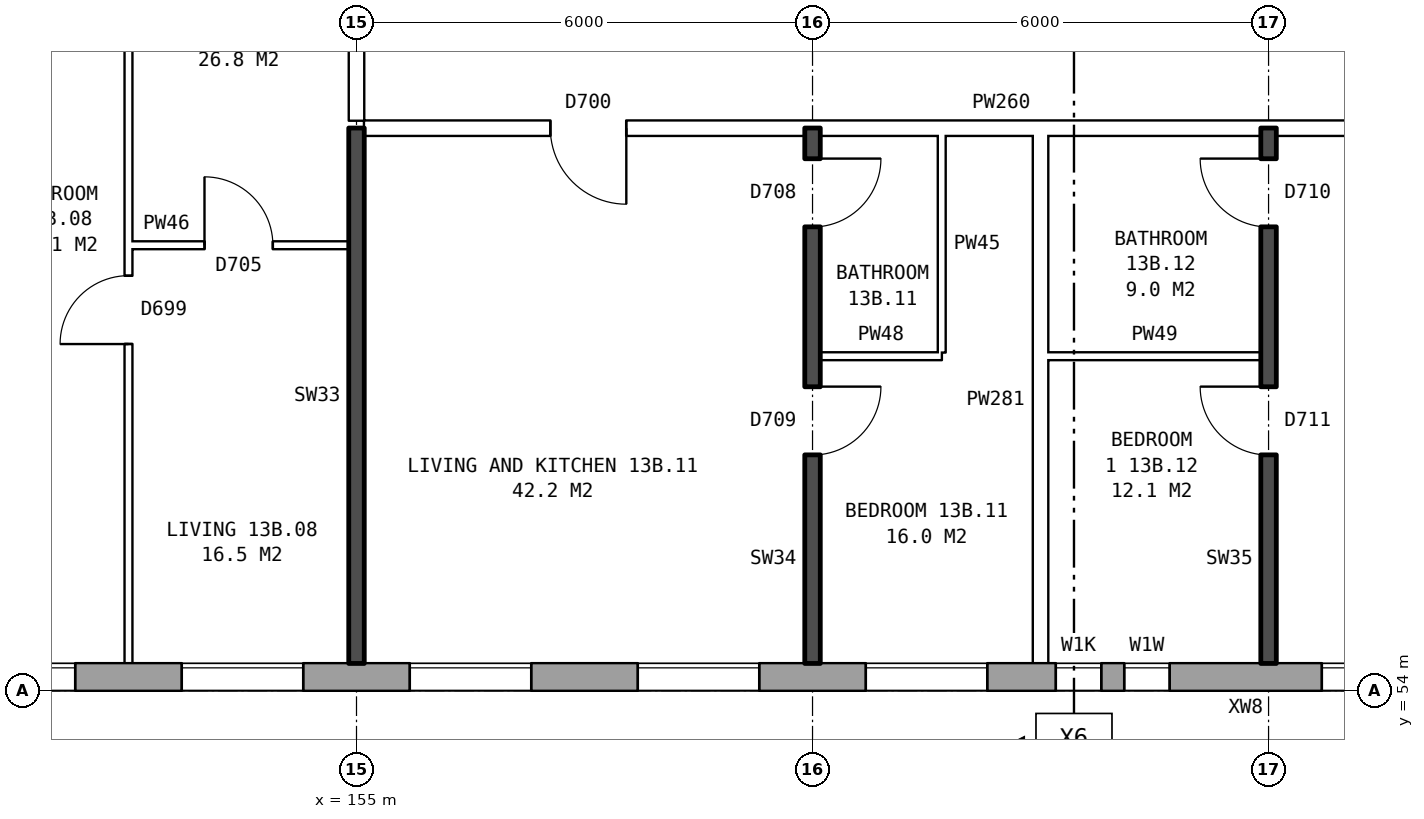
"""IFC4 building model, lengths in metres.
Left out: names, types, materials, properties, quantities, classifications, styles, units other than length and angle.
Written with IfcOpenShell. Run it as: python <this file> out.ifc"""

import sys

from ifc_helpers import new_model, si_unit, direction, frame, frame_2d, origin, place, context, subcontext, project, spatial, rectangle, extrude, element, fill, save


model = new_model("IFC4")
c1 = context("Model", 3, precision=1e-05, world=origin(), true_north=direction((0.0, 1.0)))
c2 = subcontext(c1, "Body", "Model", "MODEL_VIEW")
j1 = project(units=[si_unit("LENGTHUNIT", "METRE"), si_unit("PLANEANGLEUNIT", "RADIAN")], contexts=[c1])
p1 = place(None, origin())
s1 = spatial("IfcSite", under=j1, at=p1, CompositionType="ELEMENT")
p2 = place(p1, origin())
s2 = spatial("IfcBuilding", under=s1, at=p2, CompositionType="ELEMENT")
p3 = place(p2, frame((0.0, 0.0, 50.5)))
s3 = spatial("IfcBuildingStorey", under=s2, at=p3, CompositionType="ELEMENT", Elevation=50.5)
p4 = place(p3, frame((134.075, 54.18, 0.0), z_axis=(0.0, 0.0, 1.0), x_axis=(1.0, 0.0, 0.0)))
e1 = element("IfcWall", 1, at=p4, inside=s3, PredefinedType="STANDARD", context=c2, shape_type="SweptSolid", body=[
    extrude(rectangle(XDim=39.351, YDim=0.36, at=frame_2d((19.675, 0.0))), origin(), (0.0, 0.0, 1.0), 2.85),
])
p5 = place(p4, frame((0.625, 0.0, 0.8)))
e2 = element("IfcOpeningElement", 2, at=p5, cuts=e1, PredefinedType="OPENING", context=c2, shape_type="SweptSolid", body=[
    extrude(rectangle(XDim=1.6, YDim=1.8, at=frame_2d((0.8, 0.9))), frame((0.0, 0.19, 0.0), z_axis=(0.0, -1.0, 0.0), x_axis=(1.0, 0.0, 0.0)), (0.0, 0.0, 1.0), 0.38),
])
p6 = place(p4, frame((3.625, 0.0, 0.8)))
e3 = element("IfcOpeningElement", 3, at=p6, cuts=e1, PredefinedType="OPENING", context=c2, shape_type="SweptSolid", body=[
    extrude(rectangle(XDim=1.6, YDim=1.8, at=frame_2d((0.8, 0.9))), frame((0.0, 0.19, 0.0), z_axis=(0.0, -1.0, 0.0), x_axis=(1.0, 0.0, 0.0)), (0.0, 0.0, 1.0), 0.38),
])
p7 = place(p4, frame((5.525, 0.0, 1.4)))
e4 = element("IfcOpeningElement", 4, at=p7, cuts=e1, PredefinedType="OPENING", context=c2, shape_type="SweptSolid", body=[
    extrude(rectangle(XDim=0.6, YDim=1.2, at=frame_2d((0.3, 0.6))), frame((0.0, 0.19, 0.0), z_axis=(0.0, -1.0, 0.0), x_axis=(1.0, 0.0, 0.0)), (0.0, 0.0, 1.0), 0.38),
])
p8 = place(p4, frame((9.625, 0.0, 0.8)))
e5 = element("IfcOpeningElement", 5, at=p8, cuts=e1, PredefinedType="OPENING", context=c2, shape_type="SweptSolid", body=[
    extrude(rectangle(XDim=1.6, YDim=1.8, at=frame_2d((0.8, 0.9))), frame((0.0, 0.19, 0.0), z_axis=(0.0, -1.0, 0.0), x_axis=(1.0, 0.0, 0.0)), (0.0, 0.0, 1.0), 0.38),
])
p9 = place(p4, frame((12.625, 0.0, 0.8)))
e6 = element("IfcOpeningElement", 6, at=p9, cuts=e1, PredefinedType="OPENING", context=c2, shape_type="SweptSolid", body=[
    extrude(rectangle(XDim=1.6, YDim=1.8, at=frame_2d((0.8, 0.9))), frame((0.0, 0.19, 0.0), z_axis=(0.0, -1.0, 0.0), x_axis=(1.0, 0.0, 0.0)), (0.0, 0.0, 1.0), 0.38),
])
p10 = place(p4, frame((15.625, 0.0, 0.8)))
e7 = element("IfcOpeningElement", 7, at=p10, cuts=e1, PredefinedType="OPENING", context=c2, shape_type="SweptSolid", body=[
    extrude(rectangle(XDim=1.6, YDim=1.8, at=frame_2d((0.8, 0.9))), frame((0.0, 0.19, 0.0), z_axis=(0.0, -1.0, 0.0), x_axis=(1.0, 0.0, 0.0)), (0.0, 0.0, 1.0), 0.38),
])
p11 = place(p4, frame((18.625, 0.0, 0.8)))
e8 = element("IfcOpeningElement", 8, at=p11, cuts=e1, PredefinedType="OPENING", context=c2, shape_type="SweptSolid", body=[
    extrude(rectangle(XDim=1.6, YDim=1.8, at=frame_2d((0.8, 0.9))), frame((0.0, 0.19, 0.0), z_axis=(0.0, -1.0, 0.0), x_axis=(1.0, 0.0, 0.0)), (0.0, 0.0, 1.0), 0.38),
])
p12 = place(p4, frame((21.625, 0.0, 0.8)))
e9 = element("IfcOpeningElement", 9, at=p12, cuts=e1, PredefinedType="OPENING", context=c2, shape_type="SweptSolid", body=[
    extrude(rectangle(XDim=1.6, YDim=1.8, at=frame_2d((0.8, 0.9))), frame((0.0, 0.19, 0.0), z_axis=(0.0, -1.0, 0.0), x_axis=(1.0, 0.0, 0.0)), (0.0, 0.0, 1.0), 0.38),
])
p13 = place(p4, frame((24.625, 0.0, 0.8)))
e10 = element("IfcOpeningElement", 10, at=p13, cuts=e1, PredefinedType="OPENING", context=c2, shape_type="SweptSolid", body=[
    extrude(rectangle(XDim=1.6, YDim=1.8, at=frame_2d((0.8, 0.9))), frame((0.0, 0.19, 0.0), z_axis=(0.0, -1.0, 0.0), x_axis=(1.0, 0.0, 0.0)), (0.0, 0.0, 1.0), 0.38),
])
p14 = place(p4, frame((27.625, 0.0, 0.8)))
e11 = element("IfcOpeningElement", 11, at=p14, cuts=e1, PredefinedType="OPENING", context=c2, shape_type="SweptSolid", body=[
    extrude(rectangle(XDim=1.6, YDim=1.8, at=frame_2d((0.8, 0.9))), frame((0.0, 0.19, 0.0), z_axis=(0.0, -1.0, 0.0), x_axis=(1.0, 0.0, 0.0)), (0.0, 0.0, 1.0), 0.38),
])
p15 = place(p4, frame((30.125, 0.0, 0.8)))
e12 = element("IfcOpeningElement", 12, at=p15, cuts=e1, PredefinedType="OPENING", context=c2, shape_type="SweptSolid", body=[
    extrude(rectangle(XDim=0.6, YDim=1.5, at=frame_2d((0.3, 0.75))), frame((0.0, 0.19, 0.0), z_axis=(0.0, -1.0, 0.0), x_axis=(1.0, 0.0, 0.0)), (0.0, 0.0, 1.0), 0.38),
])
p16 = place(p4, frame((33.625, 0.0, 0.8)))
e13 = element("IfcOpeningElement", 13, at=p16, cuts=e1, PredefinedType="OPENING", context=c2, shape_type="SweptSolid", body=[
    extrude(rectangle(XDim=1.6, YDim=1.8, at=frame_2d((0.8, 0.9))), frame((0.0, 0.19, 0.0), z_axis=(0.0, -1.0, 0.0), x_axis=(1.0, 0.0, 0.0)), (0.0, 0.0, 1.0), 0.38),
])
p17 = place(p4, frame((36.625, 0.0, 0.8)))
e14 = element("IfcOpeningElement", 14, at=p17, cuts=e1, PredefinedType="OPENING", context=c2, shape_type="SweptSolid", body=[
    extrude(rectangle(XDim=1.6, YDim=1.8, at=frame_2d((0.8, 0.9))), frame((0.0, 0.19, 0.0), z_axis=(0.0, -1.0, 0.0), x_axis=(1.0, 0.0, 0.0)), (0.0, 0.0, 1.0), 0.38),
])
p18 = place(p4, frame((7.725, 0.0, 0.8)))
e15 = element("IfcOpeningElement", 15, at=p18, cuts=e1, PredefinedType="OPENING", context=c2, shape_type="SweptSolid", body=[
    extrude(rectangle(XDim=1.0, YDim=0.9, at=frame_2d((0.5, 0.45))), frame((0.0, 0.19, 0.0), z_axis=(0.0, -1.0, 0.0), x_axis=(1.0, 0.0, 0.0)), (0.0, 0.0, 1.0), 0.38),
])
p19 = place(p4, frame((31.025, 0.0, 0.8)))
e16 = element("IfcOpeningElement", 16, at=p19, cuts=e1, PredefinedType="OPENING", context=c2, shape_type="SweptSolid", body=[
    extrude(rectangle(XDim=0.6, YDim=0.9, at=frame_2d((0.3, 0.45))), frame((0.0, 0.19, 0.0), z_axis=(0.0, -1.0, 0.0), x_axis=(1.0, 0.0, 0.0)), (0.0, 0.0, 1.0), 0.38),
])
p20 = place(p3, frame((161.1, 58.4, 0.0), z_axis=(0.0, 0.0, 1.0), x_axis=(1.0, 0.0, 0.0)))
e17 = element("IfcWall", 17, at=p20, inside=s3, PredefinedType="PARTITIONING", context=c2, shape_type="SweptSolid", body=[
    extrude(rectangle(XDim=1.6, YDim=0.1, at=frame_2d((0.8, 0.0))), origin(), (0.0, 0.0, 1.0), 2.85),
])
p21 = place(p3, frame((164.1, 58.4, 0.0), z_axis=(0.0, 0.0, 1.0), x_axis=(1.0, 0.0, 0.0)))
e18 = element("IfcWall", 18, at=p21, inside=s3, PredefinedType="PARTITIONING", context=c2, shape_type="SweptSolid", body=[
    extrude(rectangle(XDim=2.8, YDim=0.1, at=frame_2d((1.4, 0.0))), origin(), (0.0, 0.0, 1.0), 2.85),
])
p22 = place(p3, frame((152.0, 59.86, 0.0), z_axis=(0.0, 0.0, 1.0), x_axis=(1.0, 0.0, 0.0)))
e19 = element("IfcWall", 19, at=p22, inside=s3, PredefinedType="PARTITIONING", context=c2, shape_type="SweptSolid", body=[
    extrude(rectangle(XDim=2.9, YDim=0.1, at=frame_2d((1.45, 0.0))), origin(), (0.0, 0.0, 1.0), 2.85),
])
p23 = place(p22, frame((1.0, 0.0, 0.0)))
e20 = element("IfcOpeningElement", 20, at=p23, cuts=e19, PredefinedType="OPENING", context=c2, shape_type="SweptSolid", body=[
    extrude(rectangle(XDim=0.9, YDim=2.1, at=frame_2d((0.45, 1.05))), frame((0.0, 0.06, 0.0), z_axis=(0.0, -1.0, 0.0), x_axis=(1.0, 0.0, 0.0)), (0.0, 0.0, 1.0), 0.12),
])
p24 = place(p3, frame((155.1, 61.4, 0.0), z_axis=(0.0, 0.0, 1.0), x_axis=(1.0, 0.0, 0.0)))
e21 = element("IfcWall", 21, at=p24, inside=s3, PredefinedType="PARTITIONING", context=c2, shape_type="SweptSolid", body=[
    extrude(rectangle(XDim=21.04, YDim=0.2, at=frame_2d((10.52, 0.0))), origin(), (0.0, 0.0, 1.0), 2.85),
])
p25 = place(p24, frame((2.45, 0.0, 0.0)))
e22 = element("IfcOpeningElement", 22, at=p25, cuts=e21, PredefinedType="OPENING", context=c2, shape_type="SweptSolid", body=[
    extrude(rectangle(XDim=1.0, YDim=2.1, at=frame_2d((0.5, 1.05))), frame((0.0, 0.11, 0.0), z_axis=(0.0, -1.0, 0.0), x_axis=(1.0, 0.0, 0.0)), (0.0, 0.0, 1.0), 0.22),
])
p26 = place(p24, frame((14.4, 0.0, 0.0)))
e23 = element("IfcOpeningElement", 23, at=p26, cuts=e21, PredefinedType="OPENING", context=c2, shape_type="SweptSolid", body=[
    extrude(rectangle(XDim=1.0, YDim=2.1, at=frame_2d((0.5, 1.05))), frame((0.0, 0.11, 0.0), z_axis=(0.0, -1.0, 0.0), x_axis=(1.0, 0.0, 0.0)), (0.0, 0.0, 1.0), 0.22),
])
p27 = place(p3, frame((152.0, 54.36, 0.0), z_axis=(0.0, 0.0, 1.0), x_axis=(0.0, 1.0, 0.0)))
e24 = element("IfcWall", 24, at=p27, inside=s3, PredefinedType="PARTITIONING", context=c2, shape_type="SweptSolid", body=[
    extrude(rectangle(XDim=14.34, YDim=0.1, at=frame_2d((7.17, 0.0))), origin(), (0.0, 0.0, 1.0), 2.85),
])
p28 = place(p27, frame((4.2, 0.0, 0.0)))
e25 = element("IfcOpeningElement", 25, at=p28, cuts=e24, PredefinedType="OPENING", context=c2, shape_type="SweptSolid", body=[
    extrude(rectangle(XDim=0.9, YDim=2.1, at=frame_2d((0.45, 1.05))), frame((0.0, 0.06, 0.0), z_axis=(0.0, -1.0, 0.0), x_axis=(1.0, 0.0, 0.0)), (0.0, 0.0, 1.0), 0.12),
])
p29 = place(p27, frame((13.04, 0.0, 0.0)))
e26 = element("IfcOpeningElement", 26, at=p29, cuts=e24, PredefinedType="OPENING", context=c2, shape_type="SweptSolid", body=[
    extrude(rectangle(XDim=0.9, YDim=2.1, at=frame_2d((0.45, 1.05))), frame((0.0, 0.06, 0.0), z_axis=(0.0, -1.0, 0.0), x_axis=(1.0, 0.0, 0.0)), (0.0, 0.0, 1.0), 0.12),
])
p30 = place(p3, frame((155.0, 54.36, 0.0), z_axis=(0.0, 0.0, 1.0), x_axis=(0.0, 1.0, 0.0)))
e27 = element("IfcWall", 27, at=p30, inside=s3, PredefinedType="SOLIDWALL", context=c2, shape_type="SweptSolid", body=[
    extrude(rectangle(XDim=7.04, YDim=0.2, at=frame_2d((3.52, 0.0))), origin(), (0.0, 0.0, 1.0), 2.85),
])
p31 = place(p3, frame((155.0, 61.5, 0.0), z_axis=(0.0, 0.0, 1.0), x_axis=(0.0, 1.0, 0.0)))
e28 = element("IfcWall", 28, at=p31, inside=s3, PredefinedType="PARTITIONING", context=c2, shape_type="SweptSolid", body=[
    extrude(rectangle(XDim=2.2, YDim=0.2, at=frame_2d((1.1, 0.0))), origin(), (0.0, 0.0, 1.0), 2.85),
])
p32 = place(p3, frame((161.0, 54.36, 0.0), z_axis=(0.0, 0.0, 1.0), x_axis=(0.0, 1.0, 0.0)))
e29 = element("IfcWall", 29, at=p32, inside=s3, PredefinedType="SOLIDWALL", context=c2, shape_type="SweptSolid", body=[
    extrude(rectangle(XDim=7.04, YDim=0.2, at=frame_2d((3.52, 0.0))), origin(), (0.0, 0.0, 1.0), 2.85),
])
p33 = place(p32, frame((2.74, 0.0, 0.0)))
e30 = element("IfcOpeningElement", 30, at=p33, cuts=e29, PredefinedType="OPENING", context=c2, shape_type="SweptSolid", body=[
    extrude(rectangle(XDim=0.9, YDim=2.1, at=frame_2d((0.45, 1.05))), frame((0.0, 0.11, 0.0), z_axis=(0.0, -1.0, 0.0), x_axis=(1.0, 0.0, 0.0)), (0.0, 0.0, 1.0), 0.22),
])
p34 = place(p32, frame((5.74, 0.0, 0.0)))
e31 = element("IfcOpeningElement", 31, at=p34, cuts=e29, PredefinedType="OPENING", context=c2, shape_type="SweptSolid", body=[
    extrude(rectangle(XDim=0.9, YDim=2.1, at=frame_2d((0.45, 1.05))), frame((0.0, 0.11, 0.0), z_axis=(0.0, -1.0, 0.0), x_axis=(1.0, 0.0, 0.0)), (0.0, 0.0, 1.0), 0.22),
])
p35 = place(p3, frame((162.7, 58.45, 0.0), z_axis=(0.0, 0.0, 1.0), x_axis=(0.0, 1.0, 0.0)))
e32 = element("IfcWall", 32, at=p35, inside=s3, PredefinedType="PARTITIONING", context=c2, shape_type="SweptSolid", body=[
    extrude(rectangle(XDim=2.85, YDim=0.1, at=frame_2d((1.425, 0.0))), origin(), (0.0, 0.0, 1.0), 2.85),
])
p36 = place(p3, frame((164.0, 54.36, 0.0), z_axis=(0.0, 0.0, 1.0), x_axis=(0.0, 1.0, 0.0)))
e33 = element("IfcWall", 33, at=p36, inside=s3, PredefinedType="PARTITIONING", context=c2, shape_type="SweptSolid", body=[
    extrude(rectangle(XDim=6.94, YDim=0.2, at=frame_2d((3.47, 0.0))), origin(), (0.0, 0.0, 1.0), 2.85),
])
p37 = place(p3, frame((167.0, 54.36, 0.0), z_axis=(0.0, 0.0, 1.0), x_axis=(0.0, 1.0, 0.0)))
e34 = element("IfcWall", 34, at=p37, inside=s3, PredefinedType="SOLIDWALL", context=c2, shape_type="SweptSolid", body=[
    extrude(rectangle(XDim=7.04, YDim=0.2, at=frame_2d((3.52, 0.0))), origin(), (0.0, 0.0, 1.0), 2.85),
])
p38 = place(p37, frame((2.74, 0.0, 0.0)))
e35 = element("IfcOpeningElement", 35, at=p38, cuts=e34, PredefinedType="OPENING", context=c2, shape_type="SweptSolid", body=[
    extrude(rectangle(XDim=0.9, YDim=2.1, at=frame_2d((0.45, 1.05))), frame((0.0, 0.11, 0.0), z_axis=(0.0, -1.0, 0.0), x_axis=(1.0, 0.0, 0.0)), (0.0, 0.0, 1.0), 0.22),
])
p39 = place(p37, frame((5.74, 0.0, 0.0)))
e36 = element("IfcOpeningElement", 36, at=p39, cuts=e34, PredefinedType="OPENING", context=c2, shape_type="SweptSolid", body=[
    extrude(rectangle(XDim=0.9, YDim=2.1, at=frame_2d((0.45, 1.05))), frame((0.0, 0.11, 0.0), z_axis=(0.0, -1.0, 0.0), x_axis=(1.0, 0.0, 0.0)), (0.0, 0.0, 1.0), 0.22),
])
p40 = place(p10, origin())
e37 = element("IfcWindow", 37, at=p40, inside=s3, PartitioningType="SINGLE_PANEL", PredefinedType="WINDOW", context=c2, shape_type="SweptSolid", body=[
    extrude(rectangle(XDim=1.6, YDim=1.8, at=frame_2d((0.8, 0.9))), frame((0.0, 0.15, 0.0), z_axis=(0.0, -1.0, 0.0), x_axis=(1.0, 0.0, 0.0)), (0.0, 0.0, 1.0), 0.06),
])
fill(e7, e37)
p41 = place(p11, origin())
e38 = element("IfcWindow", 38, at=p41, inside=s3, PartitioningType="SINGLE_PANEL", PredefinedType="WINDOW", context=c2, shape_type="SweptSolid", body=[
    extrude(rectangle(XDim=1.6, YDim=1.8, at=frame_2d((0.8, 0.9))), frame((0.0, 0.15, 0.0), z_axis=(0.0, -1.0, 0.0), x_axis=(1.0, 0.0, 0.0)), (0.0, 0.0, 1.0), 0.06),
])
fill(e8, e38)
p42 = place(p12, origin())
e39 = element("IfcWindow", 39, at=p42, inside=s3, PartitioningType="SINGLE_PANEL", PredefinedType="WINDOW", context=c2, shape_type="SweptSolid", body=[
    extrude(rectangle(XDim=1.6, YDim=1.8, at=frame_2d((0.8, 0.9))), frame((0.0, 0.15, 0.0), z_axis=(0.0, -1.0, 0.0), x_axis=(1.0, 0.0, 0.0)), (0.0, 0.0, 1.0), 0.06),
])
fill(e9, e39)
p43 = place(p13, origin())
e40 = element("IfcWindow", 40, at=p43, inside=s3, PartitioningType="SINGLE_PANEL", PredefinedType="WINDOW", context=c2, shape_type="SweptSolid", body=[
    extrude(rectangle(XDim=1.6, YDim=1.8, at=frame_2d((0.8, 0.9))), frame((0.0, 0.15, 0.0), z_axis=(0.0, -1.0, 0.0), x_axis=(1.0, 0.0, 0.0)), (0.0, 0.0, 1.0), 0.06),
])
fill(e10, e40)
p44 = place(p14, origin())
e41 = element("IfcWindow", 41, at=p44, inside=s3, PartitioningType="SINGLE_PANEL", PredefinedType="WINDOW", context=c2, shape_type="SweptSolid", body=[
    extrude(rectangle(XDim=1.6, YDim=1.8, at=frame_2d((0.8, 0.9))), frame((0.0, 0.15, 0.0), z_axis=(0.0, -1.0, 0.0), x_axis=(1.0, 0.0, 0.0)), (0.0, 0.0, 1.0), 0.06),
])
fill(e11, e41)
p45 = place(p15, origin())
e42 = element("IfcWindow", 42, at=p45, inside=s3, PartitioningType="SINGLE_PANEL", PredefinedType="WINDOW", context=c2, shape_type="SweptSolid", body=[
    extrude(rectangle(XDim=0.6, YDim=1.5, at=frame_2d((0.3, 0.75))), frame((0.0, 0.15, 0.0), z_axis=(0.0, -1.0, 0.0), x_axis=(1.0, 0.0, 0.0)), (0.0, 0.0, 1.0), 0.06),
])
fill(e12, e42)
p46 = place(p16, origin())
e43 = element("IfcWindow", 43, at=p46, inside=s3, PartitioningType="SINGLE_PANEL", PredefinedType="WINDOW", context=c2, shape_type="SweptSolid", body=[
    extrude(rectangle(XDim=1.6, YDim=1.8, at=frame_2d((0.8, 0.9))), frame((0.0, 0.15, 0.0), z_axis=(0.0, -1.0, 0.0), x_axis=(1.0, 0.0, 0.0)), (0.0, 0.0, 1.0), 0.06),
])
fill(e13, e43)
p47 = place(p28, origin())
e44 = element("IfcDoor", 44, at=p47, inside=s3, OperationType="SINGLE_SWING_LEFT", PredefinedType="DOOR", context=c2, shape_type="SweptSolid", body=[
    extrude(rectangle(XDim=0.9, YDim=2.1, at=frame_2d((0.45, 1.05))), frame((0.0, 0.025, 0.0), z_axis=(0.0, -1.0, 0.0), x_axis=(1.0, 0.0, 0.0)), (0.0, 0.0, 1.0), 0.05),
])
fill(e25, e44)
p48 = place(p23, origin())
e45 = element("IfcDoor", 45, at=p48, inside=s3, OperationType="SINGLE_SWING_LEFT", PredefinedType="DOOR", context=c2, shape_type="SweptSolid", body=[
    extrude(rectangle(XDim=0.9, YDim=2.1, at=frame_2d((0.45, 1.05))), frame((0.0, 0.025, 0.0), z_axis=(0.0, -1.0, 0.0), x_axis=(1.0, 0.0, 0.0)), (0.0, 0.0, 1.0), 0.05),
])
fill(e20, e45)
p49 = place(p33, frame((0.9, 0.0, 0.0), z_axis=(0.0, 0.0, 1.0), x_axis=(-1.0, 0.0, 0.0)))
e46 = element("IfcDoor", 46, at=p49, inside=s3, OperationType="SINGLE_SWING_LEFT", PredefinedType="DOOR", context=c2, shape_type="SweptSolid", body=[
    extrude(rectangle(XDim=0.9, YDim=2.1, at=frame_2d((0.45, 1.05))), frame((0.0, 0.025, 0.0), z_axis=(0.0, -1.0, 0.0), x_axis=(1.0, 0.0, 0.0)), (0.0, 0.0, 1.0), 0.05),
])
fill(e30, e46)
p50 = place(p25, frame((1.0, 0.0, 0.0), z_axis=(0.0, 0.0, 1.0), x_axis=(-1.0, 0.0, 0.0)))
e47 = element("IfcDoor", 47, at=p50, inside=s3, OperationType="SINGLE_SWING_LEFT", PredefinedType="DOOR", context=c2, shape_type="SweptSolid", body=[
    extrude(rectangle(XDim=1.0, YDim=2.1, at=frame_2d((0.5, 1.05))), frame((0.0, 0.025, 0.0), z_axis=(0.0, -1.0, 0.0), x_axis=(1.0, 0.0, 0.0)), (0.0, 0.0, 1.0), 0.05),
])
fill(e22, e47)
p51 = place(p34, frame((0.9, 0.0, 0.0), z_axis=(0.0, 0.0, 1.0), x_axis=(-1.0, 0.0, 0.0)))
e48 = element("IfcDoor", 48, at=p51, inside=s3, OperationType="SINGLE_SWING_LEFT", PredefinedType="DOOR", context=c2, shape_type="SweptSolid", body=[
    extrude(rectangle(XDim=0.9, YDim=2.1, at=frame_2d((0.45, 1.05))), frame((0.0, 0.025, 0.0), z_axis=(0.0, -1.0, 0.0), x_axis=(1.0, 0.0, 0.0)), (0.0, 0.0, 1.0), 0.05),
])
fill(e31, e48)
p52 = place(p38, origin())
e49 = element("IfcDoor", 49, at=p52, inside=s3, OperationType="SINGLE_SWING_RIGHT", PredefinedType="DOOR", context=c2, shape_type="SweptSolid", body=[
    extrude(rectangle(XDim=0.9, YDim=2.1, at=frame_2d((0.45, 1.05))), frame((0.0, 0.025, 0.0), z_axis=(0.0, -1.0, 0.0), x_axis=(1.0, 0.0, 0.0)), (0.0, 0.0, 1.0), 0.05),
])
fill(e35, e49)
p53 = place(p39, origin())
e50 = element("IfcDoor", 50, at=p53, inside=s3, OperationType="SINGLE_SWING_RIGHT", PredefinedType="DOOR", context=c2, shape_type="SweptSolid", body=[
    extrude(rectangle(XDim=0.9, YDim=2.1, at=frame_2d((0.45, 1.05))), frame((0.0, 0.025, 0.0), z_axis=(0.0, -1.0, 0.0), x_axis=(1.0, 0.0, 0.0)), (0.0, 0.0, 1.0), 0.05),
])
fill(e36, e50)
p54 = place(p19, origin())
e51 = element("IfcWindow", 51, at=p54, inside=s3, PartitioningType="SINGLE_PANEL", PredefinedType="WINDOW", context=c2, shape_type="SweptSolid", body=[
    extrude(rectangle(XDim=0.6, YDim=0.9, at=frame_2d((0.3, 0.45))), frame((0.0, 0.15, 0.0), z_axis=(0.0, -1.0, 0.0), x_axis=(1.0, 0.0, 0.0)), (0.0, 0.0, 1.0), 0.06),
])
fill(e16, e51)
save(model, sys.argv[1])
